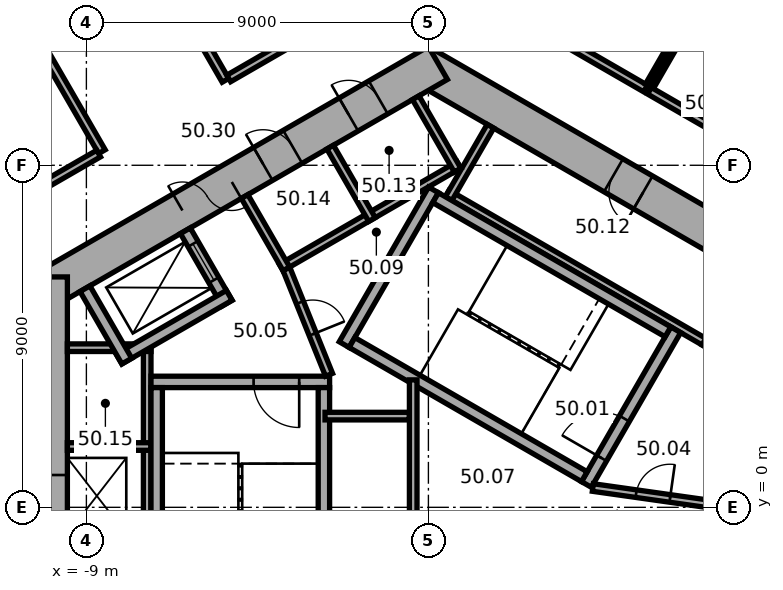
"""IFC4 building model, lengths in metres.
Left out: names, types, materials, properties, quantities, classifications, styles, units other than length and angle.
Written with IfcOpenShell. Run it as: python <this file> out.ifc"""

import sys

from ifc_helpers import new_model, si_unit, direction, frame, frame_2d, origin, place, context, subcontext, project, spatial, rectangle, extrude, element, fill, save


model = new_model("IFC4")
c1 = context("Model", 3, precision=1e-05, world=origin(), true_north=direction((0.0, 1.0)))
c2 = subcontext(c1, "Body", "Model", "MODEL_VIEW")
j1 = project(units=[si_unit("LENGTHUNIT", "METRE"), si_unit("PLANEANGLEUNIT", "RADIAN")], contexts=[c1])
p1 = place(None, origin())
s1 = spatial("IfcSite", under=j1, at=p1, CompositionType="ELEMENT")
p2 = place(p1, origin())
s2 = spatial("IfcBuilding", under=s1, at=p2, CompositionType="ELEMENT")
p3 = place(p2, frame((0.0, 0.0, 202.1)))
s3 = spatial("IfcBuildingStorey", under=s2, at=p3, CompositionType="ELEMENT", Elevation=202.1)
p4 = place(p3, frame((10.25, 5.629, 0.0), z_axis=(0.0, 0.0, 1.0), x_axis=(-0.866022616891, 0.50000482701, 0.0)))
e1 = element("IfcWall", 1, at=p4, inside=s3, PredefinedType="SHEAR", context=c2, shape_type="SweptSolid", body=[
    extrude(rectangle(XDim=12.125, YDim=1.0, at=frame_2d((6.062, 0.0))), origin(), (0.0, 0.0, 1.0), 3.7),
])
p5 = place(p4, frame((5.312, 0.0, 0.0)))
e2 = element("IfcOpeningElement", 2, at=p5, cuts=e1, PredefinedType="OPENING", context=c2, shape_type="SweptSolid", body=[
    extrude(rectangle(XDim=0.9, YDim=2.1, at=frame_2d((0.45, 1.05))), frame((0.0, 0.51, 0.0), z_axis=(0.0, -1.0, 0.0), x_axis=(1.0, 0.0, 0.0)), (0.0, 0.0, 1.0), 1.02),
])
p6 = place(p3, frame((0.25, 11.691, 0.0), z_axis=(0.0, 0.0, 1.0), x_axis=(-0.866022616891, -0.50000482701, 0.0)))
e3 = element("IfcWall", 3, at=p6, inside=s3, PredefinedType="SHEAR", context=c2, shape_type="SweptSolid", body=[
    extrude(rectangle(XDim=12.125, YDim=1.0, at=frame_2d((6.062, 0.0))), origin(), (0.0, 0.0, 1.0), 3.7),
])
p7 = place(p6, frame((6.262, 0.0, 0.0)))
e4 = element("IfcOpeningElement", 4, at=p7, cuts=e3, PredefinedType="OPENING", context=c2, shape_type="SweptSolid", body=[
    extrude(rectangle(XDim=1.5, YDim=2.1, at=frame_2d((0.75, 1.05))), frame((0.0, 0.51, 0.0), z_axis=(0.0, -1.0, 0.0), x_axis=(1.0, 0.0, 0.0)), (0.0, 0.0, 1.0), 1.02),
])
p8 = place(p6, frame((1.812, 0.0, 0.0)))
e5 = element("IfcOpeningElement", 5, at=p8, cuts=e3, PredefinedType="OPENING", context=c2, shape_type="SweptSolid", body=[
    extrude(rectangle(XDim=0.9, YDim=2.1, at=frame_2d((0.45, 1.05))), frame((0.0, 0.51, 0.0), z_axis=(0.0, -1.0, 0.0), x_axis=(1.0, 0.0, 0.0)), (0.0, 0.0, 1.0), 1.02),
])
p9 = place(p6, frame((4.412, 0.0, 0.0)))
e6 = element("IfcOpeningElement", 6, at=p9, cuts=e3, PredefinedType="OPENING", context=c2, shape_type="SweptSolid", body=[
    extrude(rectangle(XDim=0.9, YDim=2.1, at=frame_2d((0.45, 1.05))), frame((0.0, 0.51, 0.0), z_axis=(0.0, -1.0, 0.0), x_axis=(1.0, 0.0, 0.0)), (0.0, 0.0, 1.0), 1.02),
])
p10 = place(p3, frame((-10.0, 6.062, 0.0), z_axis=(0.0, 0.0, 1.0), x_axis=(0.0, -1.0, 0.0)))
e7 = element("IfcWall", 7, at=p10, inside=s3, PredefinedType="SHEAR", context=c2, shape_type="SweptSolid", body=[
    extrude(rectangle(XDim=12.125, YDim=1.0, at=frame_2d((6.062, 0.0))), origin(), (0.0, 0.0, 1.0), 3.7),
])
p11 = place(p10, frame((5.212, 0.0, 0.0)))
e8 = element("IfcOpeningElement", 8, at=p11, cuts=e7, PredefinedType="OPENING", context=c2, shape_type="SweptSolid", body=[
    extrude(rectangle(XDim=1.1, YDim=2.1, at=frame_2d((0.55, 1.05))), frame((0.0, 0.51, 0.0), z_axis=(0.0, -1.0, 0.0), x_axis=(1.0, 0.0, 0.0)), (0.0, 0.0, 1.0), 1.02),
])
p12 = place(p10, frame((7.812, 0.0, 0.0)))
e9 = element("IfcOpeningElement", 9, at=p12, cuts=e7, PredefinedType="OPENING", context=c2, shape_type="SweptSolid", body=[
    extrude(rectangle(XDim=1.1, YDim=2.1, at=frame_2d((0.55, 1.05))), frame((0.0, 0.51, 0.0), z_axis=(0.0, -1.0, 0.0), x_axis=(1.0, 0.0, 0.0)), (0.0, 0.0, 1.0), 1.02),
])
p13 = place(p3, frame((7.424, 4.259, 0.0), z_axis=(0.0, 0.0, 1.0), x_axis=(-0.866026010844, 0.49999894854, 0.0)))
e10 = element("IfcWall", 10, at=p13, inside=s3, PredefinedType="PARTITIONING", context=c2, shape_type="SweptSolid", body=[
    extrude(rectangle(XDim=8.0, YDim=0.2, at=frame_2d((4.0, 0.0))), origin(), (0.0, 0.0, 1.0), 3.35),
])
for number, where, z_axis, x_axis in (
    (11, (7.287, 4.222, 0.0), (0.0, 0.0, 1.0), (0.5, 0.866, 0.0)),
    (12, (0.532, 8.122, 0.0), (0.0, 0.0, 1.0), (0.5, 0.866, 0.0)),
):
    element("IfcWall", number, at=place(p3, frame(where, z_axis=z_axis, x_axis=x_axis)), inside=s3, PredefinedType="PARTITIONING", context=c2, shape_type="SweptSolid", body=[
        extrude(rectangle(XDim=2.2, YDim=0.2, at=frame_2d((1.1, 0.0))), origin(), (0.0, 0.0, 1.0), 3.35),
    ])
p14 = place(p3, frame((0.803, 9.009, 0.0), z_axis=(0.0, 0.0, 1.0), x_axis=(-0.866028230842, -0.499995103361, 0.0)))
e13 = element("IfcWall", 13, at=p14, inside=s3, PredefinedType="PARTITIONING", context=c2, shape_type="SweptSolid", body=[
    extrude(rectangle(XDim=5.4, YDim=0.2, at=frame_2d((2.7, 0.0))), origin(), (0.0, 0.0, 1.0), 3.35),
])
p15 = place(p3, frame((0.767, 8.872, 0.0), z_axis=(0.0, 0.0, 1.0), x_axis=(-0.499994660107, 0.866028486751, 0.0)))
e14 = element("IfcWall", 14, at=p15, inside=s3, PredefinedType="PARTITIONING", context=c2, shape_type="SweptSolid", body=[
    extrude(rectangle(XDim=2.2, YDim=0.2, at=frame_2d((1.1, 0.0))), origin(), (0.0, 0.0, 1.0), 3.35),
])
for number, where, z_axis, x_axis in (
    (15, (-1.485, 7.572, 0.0), (0.0, 0.0, 1.0), (-0.5, 0.866, 0.0)),
    (16, (-3.737, 6.272, 0.0), (0.0, 0.0, 1.0), (-0.5, 0.866, 0.0)),
):
    element("IfcWall", number, at=place(p3, frame(where, z_axis=z_axis, x_axis=x_axis)), inside=s3, PredefinedType="PARTITIONING", context=c2, shape_type="SweptSolid", body=[
        extrude(rectangle(XDim=2.2, YDim=0.2, at=frame_2d((1.1, 0.0))), origin(), (0.0, 0.0, 1.0), 3.35),
    ])
p16 = place(p3, frame((-7.4, 4.3, 0.0), z_axis=(0.0, 0.0, 1.0), x_axis=(0.0, -1.0, 0.0)))
e17 = element("IfcWall", 17, at=p16, inside=s3, PredefinedType="PARTITIONING", context=c2, shape_type="SweptSolid", body=[
    extrude(rectangle(XDim=8.0, YDim=0.2, at=frame_2d((4.0, 0.0))), origin(), (0.0, 0.0, 1.0), 3.35),
])
for number, where, z_axis, x_axis in (
    (18, (-7.3, 4.2, 0.0), (0.0, 0.0, 1.0), (-1.0, 0.0, 0.0)),
    (19, (-7.3, 1.6, 0.0), (0.0, 0.0, 1.0), (-1.0, 0.0, 0.0)),
):
    element("IfcWall", number, at=place(p3, frame(where, z_axis=z_axis, x_axis=x_axis)), inside=s3, PredefinedType="PARTITIONING", context=c2, shape_type="SweptSolid", body=[
        extrude(rectangle(XDim=2.2, YDim=0.2, at=frame_2d((1.1, 0.0))), origin(), (0.0, 0.0, 1.0), 3.35),
    ])
p17 = place(p3, frame((4.158, 0.602, 0.0), z_axis=(0.0, 0.0, 1.0), x_axis=(0.499977259774, 0.866038532462, 0.0)))
e20 = element("IfcWall", 20, at=p17, inside=s3, PredefinedType="SHEAR", context=c2, shape_type="SweptSolid", body=[
    extrude(rectangle(XDim=4.7, YDim=0.3, at=frame_2d((2.35, 0.0))), origin(), (0.0, 0.0, 1.0), 3.35),
])
p18 = place(p17, frame((0.8, 0.0, 0.0)))
e21 = element("IfcOpeningElement", 21, at=p18, cuts=e20, PredefinedType="OPENING", context=c2, shape_type="SweptSolid", body=[
    extrude(rectangle(XDim=1.2, YDim=2.1, at=frame_2d((0.6, 1.05))), frame((0.0, 0.16, 0.0), z_axis=(0.0, -1.0, 0.0), x_axis=(1.0, 0.0, 0.0)), (0.0, 0.0, 1.0), 0.32),
])
p19 = place(p3, frame((-2.216, 4.282, 0.0), z_axis=(0.0, 0.0, 1.0), x_axis=(0.499977259774, 0.866038532462, 0.0)))
e22 = element("IfcWall", 22, at=p19, inside=s3, PredefinedType="SHEAR", context=c2, shape_type="SweptSolid", body=[
    extrude(rectangle(XDim=4.7, YDim=0.3, at=frame_2d((2.35, 0.0))), origin(), (0.0, 0.0, 1.0), 3.35),
])
for number, where, z_axis, x_axis in (
    (23, (4.103, 0.807, 0.0), (0.0, 0.0, 1.0), (-0.866, 0.5, 0.0)),
    (24, (6.303, 4.617, 0.0), (0.0, 0.0, 1.0), (-0.866, 0.5, 0.0)),
):
    element("IfcWall", number, at=place(p3, frame(where, z_axis=z_axis, x_axis=x_axis)), inside=s3, PredefinedType="SHEAR", context=c2, shape_type="SweptSolid", body=[
        extrude(rectangle(XDim=7.06, YDim=0.3, at=frame_2d((3.53, 0.0))), origin(), (0.0, 0.0, 1.0), 3.35),
    ])
p20 = place(p3, frame((-2.6, 3.3, 0.0), z_axis=(0.0, 0.0, 1.0), x_axis=(-1.0, 0.0, 0.0)))
e25 = element("IfcWall", 25, at=p20, inside=s3, PredefinedType="SHEAR", context=c2, shape_type="SweptSolid", body=[
    extrude(rectangle(XDim=4.7, YDim=0.3, at=frame_2d((2.35, 0.0))), origin(), (0.0, 0.0, 1.0), 3.35),
])
p21 = place(p20, frame((0.8, 0.0, 0.0)))
e26 = element("IfcOpeningElement", 26, at=p21, cuts=e25, PredefinedType="OPENING", context=c2, shape_type="SweptSolid", body=[
    extrude(rectangle(XDim=1.2, YDim=2.1, at=frame_2d((0.6, 1.05))), frame((0.0, 0.16, 0.0), z_axis=(0.0, -1.0, 0.0), x_axis=(1.0, 0.0, 0.0)), (0.0, 0.0, 1.0), 0.32),
])
for number, where, z_axis, x_axis in (
    (27, (-2.75, 3.15, 0.0), (0.0, 0.0, 1.0), (0.0, -1.0, 0.0)),
    (28, (-7.15, 3.15, 0.0), (0.0, 0.0, 1.0), (0.0, -1.0, 0.0)),
):
    element("IfcWall", number, at=place(p3, frame(where, z_axis=z_axis, x_axis=x_axis)), inside=s3, PredefinedType="SHEAR", context=c2, shape_type="SweptSolid", body=[
        extrude(rectangle(XDim=7.06, YDim=0.3, at=frame_2d((3.53, 0.0))), origin(), (0.0, 0.0, 1.0), 3.35),
    ])
p22 = place(p3, frame((4.327, 0.521, 0.0), z_axis=(0.0, 0.0, 1.0), x_axis=(0.990124376366, -0.14019172346, 0.0)))
e29 = element("IfcWall", 29, at=p22, inside=s3, PredefinedType="PARTITIONING", context=c2, shape_type="SweptSolid", body=[
    extrude(rectangle(XDim=3.002, YDim=0.2, at=frame_2d((1.501, 0.0))), origin(), (0.0, 0.0, 1.0), 3.35),
])
p23 = place(p22, frame((1.15, 0.0, 0.0)))
e30 = element("IfcOpeningElement", 30, at=p23, cuts=e29, PredefinedType="OPENING", context=c2, shape_type="SweptSolid", body=[
    extrude(rectangle(XDim=0.9, YDim=2.1, at=frame_2d((0.45, 1.05))), frame((0.0, 0.11, 0.0), z_axis=(0.0, -1.0, 0.0), x_axis=(1.0, 0.0, 0.0)), (0.0, 0.0, 1.0), 0.22),
])
p24 = place(p3, frame((-5.295, 5.372, 0.0), z_axis=(0.0, 0.0, 1.0), x_axis=(-0.500077893725, 0.86598042715, 0.0)))
e31 = element("IfcWall", 31, at=p24, inside=s3, PredefinedType="SHEAR", context=c2, shape_type="SweptSolid", body=[
    extrude(rectangle(XDim=2.2, YDim=0.3, at=frame_2d((1.1, 0.0))), origin(), (0.0, 0.0, 1.0), 3.35),
])
p25 = place(p24, frame((0.7, 0.0, 0.0)))
e32 = element("IfcOpeningElement", 32, at=p25, cuts=e31, PredefinedType="OPENING", context=c2, shape_type="SweptSolid", body=[
    extrude(rectangle(XDim=1.1, YDim=2.1, at=frame_2d((0.55, 1.05))), frame((0.0, 0.16, 0.0), z_axis=(0.0, -1.0, 0.0), x_axis=(1.0, 0.0, 0.0)), (0.0, 0.0, 1.0), 0.32),
])
p26 = place(p3, frame((-5.24, 5.577, 0.0), z_axis=(0.0, 0.0, 1.0), x_axis=(-0.866014461049, -0.500018952895, 0.0)))
e33 = element("IfcWall", 33, at=p26, inside=s3, PredefinedType="SHEAR", context=c2, shape_type="SweptSolid", body=[
    extrude(rectangle(XDim=3.35, YDim=0.3, at=frame_2d((1.675, 0.0))), origin(), (0.0, 0.0, 1.0), 3.35),
])
p27 = place(p3, frame((-7.937, 3.847, 0.0), z_axis=(0.0, 0.0, 1.0), x_axis=(-0.50002983664, 0.866008176907, 0.0)))
e34 = element("IfcWall", 34, at=p27, inside=s3, PredefinedType="SHEAR", context=c2, shape_type="SweptSolid", body=[
    extrude(rectangle(XDim=2.2, YDim=0.3, at=frame_2d((1.1, 0.0))), origin(), (0.0, 0.0, 1.0), 3.35),
])
p28 = place(p3, frame((-2.615, 3.487, 0.0), z_axis=(0.0, 0.0, 1.0), x_axis=(-0.373576831041, 0.92759924068, 0.0)))
e35 = element("IfcWall", 35, at=p28, inside=s3, PredefinedType="PARTITIONING", context=c2, shape_type="SweptSolid", body=[
    extrude(rectangle(XDim=3.002, YDim=0.2, at=frame_2d((1.501, 0.0))), origin(), (0.0, 0.0, 1.0), 3.35),
])
p29 = place(p28, frame((1.15, 0.0, 0.0)))
e36 = element("IfcOpeningElement", 36, at=p29, cuts=e35, PredefinedType="OPENING", context=c2, shape_type="SweptSolid", body=[
    extrude(rectangle(XDim=0.9, YDim=2.1, at=frame_2d((0.45, 1.05))), frame((0.0, 0.11, 0.0), z_axis=(0.0, -1.0, 0.0), x_axis=(1.0, 0.0, 0.0)), (0.0, 0.0, 1.0), 0.22),
])
p30 = place(p3, frame((-2.72, 2.4, 0.0), z_axis=(0.0, 0.0, 1.0), x_axis=(1.0, 0.0, 0.0)))
e37 = element("IfcWall", 37, at=p30, inside=s3, PredefinedType="PARTITIONING", context=c2, shape_type="SweptSolid", body=[
    extrude(rectangle(XDim=2.22, YDim=0.2, at=frame_2d((1.11, 0.0))), origin(), (0.0, 0.0, 1.0), 3.35),
])
p31 = place(p3, frame((-0.4, -3.353, 0.0), z_axis=(0.0, 0.0, 1.0), x_axis=(0.0, 1.0, 0.0)))
e38 = element("IfcWall", 38, at=p31, inside=s3, PredefinedType="PARTITIONING", context=c2, shape_type="SweptSolid", body=[
    extrude(rectangle(XDim=6.707, YDim=0.2, at=frame_2d((3.353, 0.0))), origin(), (0.0, 0.0, 1.0), 3.35),
])
p32 = place(p3, frame((-12.766, 16.589, 0.0), z_axis=(0.0, 0.0, 1.0), x_axis=(0.500010139422, -0.866019549707, 0.0)))
e39 = element("IfcWall", 39, at=p32, inside=s3, PredefinedType="PARTITIONING", context=c2, shape_type="SweptSolid", body=[
    extrude(rectangle(XDim=8.35, YDim=0.2, at=frame_2d((4.175, 0.0))), origin(), (0.0, 0.0, 1.0), 3.35),
])
p33 = place(p32, frame((3.675, 0.0, 0.0)))
e40 = element("IfcOpeningElement", 40, at=p33, cuts=e39, PredefinedType="OPENING", context=c2, shape_type="SweptSolid", body=[
    extrude(rectangle(XDim=1.0, YDim=2.1, at=frame_2d((0.5, 1.05))), frame((0.0, 0.11, 0.0), z_axis=(0.0, -1.0, 0.0), x_axis=(1.0, 0.0, 0.0)), (0.0, 0.0, 1.0), 0.22),
])
p34 = place(p3, frame((-9.515, 18.466, 0.0), z_axis=(0.0, 0.0, 1.0), x_axis=(0.500010139422, -0.866019549707, 0.0)))
e41 = element("IfcWall", 41, at=p34, inside=s3, PredefinedType="PARTITIONING", context=c2, shape_type="SweptSolid", body=[
    extrude(rectangle(XDim=8.35, YDim=0.2, at=frame_2d((4.175, 0.0))), origin(), (0.0, 0.0, 1.0), 2.55),
])
p35 = place(p34, frame((3.675, 0.0, 0.0)))
e42 = element("IfcOpeningElement", 42, at=p35, cuts=e41, PredefinedType="OPENING", context=c2, shape_type="SweptSolid", body=[
    extrude(rectangle(XDim=1.0, YDim=2.1, at=frame_2d((0.5, 1.05))), frame((0.0, 0.11, 0.0), z_axis=(0.0, -1.0, 0.0), x_axis=(1.0, 0.0, 0.0)), (0.0, 0.0, 1.0), 0.22),
])
p36 = place(p3, frame((-8.678, 9.308, 0.0), z_axis=(0.0, 0.0, 1.0), x_axis=(-0.866000359435, -0.500043375578, 0.0)))
e43 = element("IfcWall", 43, at=p36, inside=s3, PredefinedType="PARTITIONING", context=c2, shape_type="SweptSolid", body=[
    extrude(rectangle(XDim=3.161, YDim=0.2, at=frame_2d((1.581, 0.0))), origin(), (0.0, 0.0, 1.0), 3.35),
])
p37 = place(p3, frame((-0.95, 13.77, 0.0), z_axis=(0.0, 0.0, 1.0), x_axis=(-0.866036689987, -0.499980451214, 0.0)))
e44 = element("IfcWall", 44, at=p37, inside=s3, PredefinedType="PARTITIONING", context=c2, shape_type="SweptSolid", body=[
    extrude(rectangle(XDim=4.969, YDim=0.2, at=frame_2d((2.485, 0.0))), origin(), (0.0, 0.0, 1.0), 3.35),
])
p38 = place(p3, frame((5.713, 11.02, 0.0), z_axis=(0.0, 0.0, 1.0), x_axis=(-0.866038905227, 0.499976614087, 0.0)))
e45 = element("IfcWall", 45, at=p38, inside=s3, PredefinedType="PARTITIONING", context=c2, shape_type="SweptSolid", body=[
    extrude(rectangle(XDim=5.46, YDim=0.2, at=frame_2d((2.73, 0.0))), origin(), (0.0, 0.0, 1.0), 3.35),
])
p39 = place(p38, frame((3.955, 0.0, 0.0)))
e46 = element("IfcOpeningElement", 46, at=p39, cuts=e45, PredefinedType="OPENING", context=c2, shape_type="SweptSolid", body=[
    extrude(rectangle(XDim=1.0, YDim=2.1, at=frame_2d((0.5, 1.05))), frame((0.0, 0.11, 0.0), z_axis=(0.0, -1.0, 0.0), x_axis=(1.0, 0.0, 0.0)), (0.0, 0.0, 1.0), 0.22),
])
p40 = place(p3, frame((5.867, 11.046, 0.0), z_axis=(0.0, 0.0, 1.0), x_axis=(0.500004234368, 0.866022959057, 0.0)))
e47 = element("IfcWall", 47, at=p40, inside=s3, PredefinedType="PARTITIONING", context=c2, shape_type="SweptSolid", body=[
    extrude(rectangle(XDim=2.5, YDim=0.12, at=frame_2d((1.25, 0.0))), origin(), (0.0, 0.0, 1.0), 3.35),
])
p41 = place(p3, frame((7.483, 14.085, 0.0), z_axis=(0.0, 0.0, 1.0), x_axis=(-0.499978425106, -0.866037859697, 0.0)))
e48 = element("IfcWall", 48, at=p41, inside=s3, PredefinedType="PARTITIONING", context=c2, shape_type="SweptSolid", body=[
    extrude(rectangle(XDim=3.44, YDim=0.12, at=frame_2d((1.72, 0.0))), origin(), (0.0, 0.0, 1.0), 3.35),
])
p42 = place(p3, frame((7.722, 9.86, 0.0), z_axis=(0.0, 0.0, 1.0), x_axis=(-0.86598042715, 0.500077893725, 0.0)))
e49 = element("IfcWall", 49, at=p42, inside=s3, PredefinedType="PARTITIONING", context=c2, shape_type="SweptSolid", body=[
    extrude(rectangle(XDim=2.2, YDim=0.2, at=frame_2d((1.1, 0.0))), origin(), (0.0, 0.0, 1.0), 3.35),
])
p43 = place(p7, origin())
e50 = element("IfcDoor", 50, at=p43, inside=s3, OperationType="DOUBLE_DOOR_SINGLE_SWING", PredefinedType="DOOR", context=c2, shape_type="SweptSolid", body=[
    extrude(rectangle(XDim=1.5, YDim=2.1, at=frame_2d((0.75, 1.05))), frame((0.0, 0.025, 0.0), z_axis=(0.0, -1.0, 0.0), x_axis=(1.0, 0.0, 0.0)), (0.0, 0.0, 1.0), 0.05),
])
fill(e4, e50)
p44 = place(p18, origin())
e51 = element("IfcDoor", 51, at=p44, inside=s3, OperationType="SINGLE_SWING_RIGHT", PredefinedType="DOOR", context=c2, shape_type="SweptSolid", body=[
    extrude(rectangle(XDim=1.2, YDim=2.1, at=frame_2d((0.6, 1.05))), frame((0.0, 0.025, 0.0), z_axis=(0.0, -1.0, 0.0), x_axis=(1.0, 0.0, 0.0)), (0.0, 0.0, 1.0), 0.05),
])
fill(e21, e51)
p45 = place(p21, origin())
e52 = element("IfcDoor", 52, at=p45, inside=s3, OperationType="SINGLE_SWING_RIGHT", PredefinedType="DOOR", context=c2, shape_type="SweptSolid", body=[
    extrude(rectangle(XDim=1.2, YDim=2.1, at=frame_2d((0.6, 1.05))), frame((0.0, 0.025, 0.0), z_axis=(0.0, -1.0, 0.0), x_axis=(1.0, 0.0, 0.0)), (0.0, 0.0, 1.0), 0.05),
])
fill(e26, e52)
p46 = place(p23, origin())
e53 = element("IfcDoor", 53, at=p46, inside=s3, OperationType="SINGLE_SWING_LEFT", PredefinedType="DOOR", context=c2, shape_type="SweptSolid", body=[
    extrude(rectangle(XDim=0.9, YDim=2.1, at=frame_2d((0.45, 1.05))), frame((0.0, 0.025, 0.0), z_axis=(0.0, -1.0, 0.0), x_axis=(1.0, 0.0, 0.0)), (0.0, 0.0, 1.0), 0.05),
])
fill(e30, e53)
p47 = place(p29, origin())
e54 = element("IfcDoor", 54, at=p47, inside=s3, OperationType="SINGLE_SWING_LEFT", PredefinedType="DOOR", context=c2, shape_type="SweptSolid", body=[
    extrude(rectangle(XDim=0.9, YDim=2.1, at=frame_2d((0.45, 1.05))), frame((0.0, 0.025, 0.0), z_axis=(0.0, -1.0, 0.0), x_axis=(1.0, 0.0, 0.0)), (0.0, 0.0, 1.0), 0.05),
])
fill(e36, e54)
p48 = place(p5, origin())
e55 = element("IfcDoor", 55, at=p48, inside=s3, OperationType="SINGLE_SWING_LEFT", PredefinedType="DOOR", context=c2, shape_type="SweptSolid", body=[
    extrude(rectangle(XDim=0.9, YDim=2.1, at=frame_2d((0.45, 1.05))), frame((0.0, 0.025, 0.0), z_axis=(0.0, -1.0, 0.0), x_axis=(1.0, 0.0, 0.0)), (0.0, 0.0, 1.0), 0.05),
])
fill(e2, e55)
p49 = place(p8, origin())
e56 = element("IfcDoor", 56, at=p49, inside=s3, OperationType="SINGLE_SWING_LEFT", PredefinedType="DOOR", context=c2, shape_type="SweptSolid", body=[
    extrude(rectangle(XDim=0.9, YDim=2.1, at=frame_2d((0.45, 1.05))), frame((0.0, 0.025, 0.0), z_axis=(0.0, -1.0, 0.0), x_axis=(1.0, 0.0, 0.0)), (0.0, 0.0, 1.0), 0.05),
])
fill(e5, e56)
p50 = place(p9, origin())
e57 = element("IfcDoor", 57, at=p50, inside=s3, OperationType="SINGLE_SWING_LEFT", PredefinedType="DOOR", context=c2, shape_type="SweptSolid", body=[
    extrude(rectangle(XDim=0.9, YDim=2.1, at=frame_2d((0.45, 1.05))), frame((0.0, 0.025, 0.0), z_axis=(0.0, -1.0, 0.0), x_axis=(1.0, 0.0, 0.0)), (0.0, 0.0, 1.0), 0.05),
])
fill(e6, e57)
p51 = place(p25, origin())
e58 = element("IfcDoor", 58, at=p51, inside=s3, OperationType="DOUBLE_DOOR_SLIDING", PredefinedType="DOOR", context=c2, shape_type="SweptSolid", body=[
    extrude(rectangle(XDim=1.1, YDim=2.1, at=frame_2d((0.55, 1.05))), frame((0.0, 0.025, 0.0), z_axis=(0.0, -1.0, 0.0), x_axis=(1.0, 0.0, 0.0)), (0.0, 0.0, 1.0), 0.05),
])
fill(e32, e58)
save(model, sys.argv[1])
